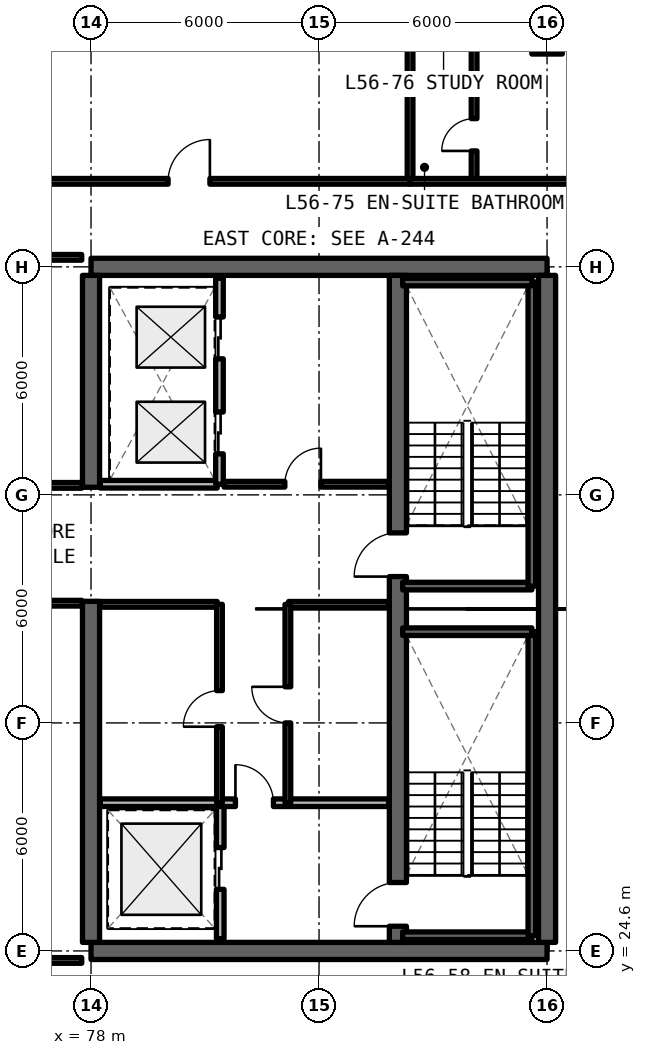
"""IFC4 building model, lengths in metres.
Left out: names, types, materials, properties, quantities, classifications, styles, units other than length and angle.
Written with IfcOpenShell. Run it as: python <this file> out.ifc"""

import sys

from ifc_helpers import new_model, si_unit, direction, frame, frame_2d, origin, origin_2d, place, context, subcontext, project, spatial, rectangle, extrude, element, fill, save


model = new_model("IFC4")
c1 = context("Model", 3, precision=1e-05, world=origin(), true_north=direction((0.0, 1.0)))
c2 = subcontext(c1, "Body", "Model", "MODEL_VIEW")
j1 = project(units=[si_unit("LENGTHUNIT", "METRE"), si_unit("PLANEANGLEUNIT", "RADIAN")], contexts=[c1])
p1 = place(None, origin())
s1 = spatial("IfcSite", under=j1, at=p1, CompositionType="ELEMENT")
p2 = place(p1, origin())
s2 = spatial("IfcBuilding", under=s1, at=p2, CompositionType="ELEMENT")
p3 = place(p2, frame((0.0, 0.0, 201.63)))
s3 = spatial("IfcBuildingStorey", under=s2, at=p3, CompositionType="ELEMENT", Elevation=201.63)
for number, where, z_axis, x_axis in (
    (1, (78.0, 24.6, 0.0), (0.0, 0.0, 1.0), (1.0, 0.0, 0.0)),
    (2, (90.0, 42.6, 0.0), (0.0, 0.0, 1.0), (-1.0, 0.0, 0.0)),
):
    element("IfcWall", number, at=place(p3, frame(where, z_axis=z_axis, x_axis=x_axis)), inside=s3, PredefinedType="SHEAR", context=c2, shape_type="SweptSolid", body=[
        extrude(rectangle(XDim=12.0, YDim=0.45, at=frame_2d((6.0, 0.0))), origin(), (0.0, 0.0, 1.0), 3.3),
    ])
p4 = place(p3, frame((90.0, 24.825, 0.0), z_axis=(0.0, 0.0, 1.0), x_axis=(0.0, 1.0, 0.0)))
e3 = element("IfcWall", 3, at=p4, inside=s3, PredefinedType="SHEAR", context=c2, shape_type="SweptSolid", body=[
    extrude(rectangle(XDim=17.55, YDim=0.45, at=frame_2d((8.775, 0.0))), origin(), (0.0, 0.0, 1.0), 3.3),
])
p5 = place(p3, frame((78.0, 24.825, 0.0), z_axis=(0.0, 0.0, 1.0), x_axis=(0.0, 1.0, 0.0)))
e4 = element("IfcWall", 4, at=p5, inside=s3, PredefinedType="SHEAR", context=c2, shape_type="SweptSolid", body=[
    extrude(rectangle(XDim=8.975, YDim=0.45, at=frame_2d((4.488, 0.0))), origin(), (0.0, 0.0, 1.0), 3.3),
])
p6 = place(p3, frame((78.0, 36.8, 0.0), z_axis=(0.0, 0.0, 1.0), x_axis=(0.0, 1.0, 0.0)))
e5 = element("IfcWall", 5, at=p6, inside=s3, PredefinedType="SHEAR", context=c2, shape_type="SweptSolid", body=[
    extrude(rectangle(XDim=5.575, YDim=0.45, at=frame_2d((2.788, 0.0))), origin(), (0.0, 0.0, 1.0), 3.3),
])
p7 = place(p3, frame((86.075, 24.825, 0.0), z_axis=(0.0, 0.0, 1.0), x_axis=(0.0, 1.0, 0.0)))
e6 = element("IfcWall", 6, at=p7, inside=s3, PredefinedType="SHEAR", context=c2, shape_type="SweptSolid", body=[
    extrude(rectangle(XDim=17.55, YDim=0.45, at=frame_2d((8.775, 0.0))), origin(), (0.0, 0.0, 1.0), 3.3),
])
p8 = place(p7, frame((0.425, 0.0, 0.0)))
e7 = element("IfcOpeningElement", 7, at=p8, cuts=e6, PredefinedType="OPENING", context=c2, shape_type="SweptSolid", body=[
    extrude(rectangle(XDim=1.15, YDim=2.15, at=frame_2d((0.575, 1.075))), frame((0.0, 0.235, 0.0), z_axis=(0.0, -1.0, 0.0), x_axis=(1.0, 0.0, 0.0)), (0.0, 0.0, 1.0), 0.47),
])
p9 = place(p7, frame((9.625, 0.0, 0.0)))
e8 = element("IfcOpeningElement", 8, at=p9, cuts=e6, PredefinedType="OPENING", context=c2, shape_type="SweptSolid", body=[
    extrude(rectangle(XDim=1.15, YDim=2.15, at=frame_2d((0.575, 1.075))), frame((0.0, 0.235, 0.0), z_axis=(0.0, -1.0, 0.0), x_axis=(1.0, 0.0, 0.0)), (0.0, 0.0, 1.0), 0.47),
])
p10 = place(p3, frame((90.0, 48.6, 0.0), z_axis=(0.0, 0.0, 1.0), x_axis=(1.0, 0.0, 0.0)))
e9 = element("IfcColumn", 9, at=p10, inside=s3, PredefinedType="COLUMN", context=c2, shape_type="SweptSolid", body=[
    extrude(rectangle(XDim=0.8, YDim=0.8, at=origin_2d()), origin(), (0.0, 0.0, 1.0), 3.3),
])
p11 = place(p3, frame((81.4, 24.92, 0.0), z_axis=(0.0, 0.0, 1.0), x_axis=(0.0, 1.0, 0.0)))
e10 = element("IfcWall", 10, at=p11, inside=s3, PredefinedType="SOLIDWALL", context=c2, shape_type="SweptSolid", body=[
    extrude(rectangle(XDim=3.58, YDim=0.2, at=frame_2d((1.79, 0.0))), origin(), (0.0, 0.0, 1.0), 2.35),
])
p12 = place(p11, frame((1.3, 0.0, 0.0)))
e11 = element("IfcOpeningElement", 11, at=p12, cuts=e10, PredefinedType="OPENING", context=c2, shape_type="SweptSolid", body=[
    extrude(rectangle(XDim=1.1, YDim=2.2, at=frame_2d((0.55, 1.1))), frame((0.0, 0.11, 0.0), z_axis=(0.0, -1.0, 0.0), x_axis=(1.0, 0.0, 0.0)), (0.0, 0.0, 1.0), 0.22),
])
p13 = place(p3, frame((78.245, 28.5, 0.0), z_axis=(0.0, 0.0, 1.0), x_axis=(1.0, 0.0, 0.0)))
e12 = element("IfcWall", 12, at=p13, inside=s3, PredefinedType="SOLIDWALL", context=c2, shape_type="SweptSolid", body=[
    extrude(rectangle(XDim=7.585, YDim=0.2, at=frame_2d((3.792, 0.0))), origin(), (0.0, 0.0, 1.0), 2.35),
])
p14 = place(p13, frame((3.555, 0.0, 0.0)))
e13 = element("IfcOpeningElement", 13, at=p14, cuts=e12, PredefinedType="OPENING", context=c2, shape_type="SweptSolid", body=[
    extrude(rectangle(XDim=1.0, YDim=2.15, at=frame_2d((0.5, 1.075))), frame((0.0, 0.11, 0.0), z_axis=(0.0, -1.0, 0.0), x_axis=(1.0, 0.0, 0.0)), (0.0, 0.0, 1.0), 0.22),
])
p15 = place(p3, frame((83.2, 33.72, 0.0), z_axis=(0.0, 0.0, 1.0), x_axis=(1.0, 0.0, 0.0)))
e14 = element("IfcWall", 14, at=p15, inside=s3, PredefinedType="SOLIDWALL", context=c2, shape_type="SweptSolid", body=[
    extrude(rectangle(XDim=2.63, YDim=0.15, at=frame_2d((1.315, 0.0))), origin(), (0.0, 0.0, 1.0), 2.35),
])
p16 = place(p3, frame((83.18, 28.5, 0.0), z_axis=(0.0, 0.0, 1.0), x_axis=(0.0, 1.0, 0.0)))
e15 = element("IfcWall", 15, at=p16, inside=s3, PredefinedType="SOLIDWALL", context=c2, shape_type="SweptSolid", body=[
    extrude(rectangle(XDim=5.22, YDim=0.15, at=frame_2d((2.61, 0.0))), origin(), (0.0, 0.0, 1.0), 2.35),
])
p17 = place(p16, frame((2.1, 0.0, 0.0)))
e16 = element("IfcOpeningElement", 16, at=p17, cuts=e15, PredefinedType="OPENING", context=c2, shape_type="SweptSolid", body=[
    extrude(rectangle(XDim=0.95, YDim=2.15, at=frame_2d((0.475, 1.075))), frame((0.0, 0.085, 0.0), z_axis=(0.0, -1.0, 0.0), x_axis=(1.0, 0.0, 0.0)), (0.0, 0.0, 1.0), 0.17),
])
p18 = place(p3, frame((78.245, 33.72, 0.0), z_axis=(0.0, 0.0, 1.0), x_axis=(1.0, 0.0, 0.0)))
e17 = element("IfcWall", 17, at=p18, inside=s3, PredefinedType="SOLIDWALL", context=c2, shape_type="SweptSolid", body=[
    extrude(rectangle(XDim=3.075, YDim=0.15, at=frame_2d((1.538, 0.0))), origin(), (0.0, 0.0, 1.0), 2.35),
])
p19 = place(p3, frame((81.38, 28.5, 0.0), z_axis=(0.0, 0.0, 1.0), x_axis=(0.0, 1.0, 0.0)))
e18 = element("IfcWall", 18, at=p19, inside=s3, PredefinedType="SOLIDWALL", context=c2, shape_type="SweptSolid", body=[
    extrude(rectangle(XDim=5.22, YDim=0.15, at=frame_2d((2.61, 0.0))), origin(), (0.0, 0.0, 1.0), 2.35),
])
p20 = place(p19, frame((2.0, 0.0, 0.0)))
e19 = element("IfcOpeningElement", 19, at=p20, cuts=e18, PredefinedType="OPENING", context=c2, shape_type="SweptSolid", body=[
    extrude(rectangle(XDim=0.95, YDim=2.15, at=frame_2d((0.475, 1.075))), frame((0.0, 0.085, 0.0), z_axis=(0.0, -1.0, 0.0), x_axis=(1.0, 0.0, 0.0)), (0.0, 0.0, 1.0), 0.17),
])
p21 = place(p3, frame((81.5, 36.88, 0.0), z_axis=(0.0, 0.0, 1.0), x_axis=(1.0, 0.0, 0.0)))
e20 = element("IfcWall", 20, at=p21, inside=s3, PredefinedType="SOLIDWALL", context=c2, shape_type="SweptSolid", body=[
    extrude(rectangle(XDim=4.33, YDim=0.15, at=frame_2d((2.165, 0.0))), origin(), (0.0, 0.0, 1.0), 2.35),
])
p22 = place(p21, frame((1.6, 0.0, 0.0)))
e21 = element("IfcOpeningElement", 21, at=p22, cuts=e20, PredefinedType="OPENING", context=c2, shape_type="SweptSolid", body=[
    extrude(rectangle(XDim=0.95, YDim=2.15, at=frame_2d((0.475, 1.075))), frame((0.0, 0.085, 0.0), z_axis=(0.0, -1.0, 0.0), x_axis=(1.0, 0.0, 0.0)), (0.0, 0.0, 1.0), 0.17),
])
p23 = place(p3, frame((78.245, 36.88, 0.0), z_axis=(0.0, 0.0, 1.0), x_axis=(1.0, 0.0, 0.0)))
e22 = element("IfcWall", 22, at=p23, inside=s3, PredefinedType="SOLIDWALL", context=c2, shape_type="SweptSolid", body=[
    extrude(rectangle(XDim=3.075, YDim=0.2, at=frame_2d((1.538, 0.0))), origin(), (0.0, 0.0, 1.0), 2.35),
])
p24 = place(p3, frame((81.38, 36.88, 0.0), z_axis=(0.0, 0.0, 1.0), x_axis=(0.0, 1.0, 0.0)))
e23 = element("IfcWall", 23, at=p24, inside=s3, PredefinedType="SOLIDWALL", context=c2, shape_type="SweptSolid", body=[
    extrude(rectangle(XDim=5.42, YDim=0.2, at=frame_2d((2.71, 0.0))), origin(), (0.0, 0.0, 1.0), 2.35),
])
p25 = place(p24, frame((0.8, 0.0, 0.0)))
e24 = element("IfcOpeningElement", 24, at=p25, cuts=e23, PredefinedType="OPENING", context=c2, shape_type="SweptSolid", body=[
    extrude(rectangle(XDim=1.1, YDim=2.2, at=frame_2d((0.55, 1.1))), frame((0.0, 0.11, 0.0), z_axis=(0.0, -1.0, 0.0), x_axis=(1.0, 0.0, 0.0)), (0.0, 0.0, 1.0), 0.22),
])
p26 = place(p24, frame((3.3, 0.0, 0.0)))
e25 = element("IfcOpeningElement", 25, at=p26, cuts=e23, PredefinedType="OPENING", context=c2, shape_type="SweptSolid", body=[
    extrude(rectangle(XDim=1.1, YDim=2.2, at=frame_2d((0.55, 1.1))), frame((0.0, 0.11, 0.0), z_axis=(0.0, -1.0, 0.0), x_axis=(1.0, 0.0, 0.0)), (0.0, 0.0, 1.0), 0.22),
])
p27 = place(p3, frame((69.85, 24.35, 0.0), z_axis=(0.0, 0.0, 1.0), x_axis=(1.0, 0.0, 0.0)))
e26 = element("IfcWall", 26, at=p27, inside=s3, PredefinedType="SOLIDWALL", context=c2, shape_type="SweptSolid", body=[
    extrude(rectangle(XDim=7.905, YDim=0.15, at=frame_2d((3.952, 0.0))), origin(), (0.0, 0.0, 1.0), 2.35),
])
p28 = place(p3, frame((69.85, 33.75, 0.0), z_axis=(0.0, 0.0, 1.0), x_axis=(1.0, 0.0, 0.0)))
e27 = element("IfcWall", 27, at=p28, inside=s3, PredefinedType="SOLIDWALL", context=c2, shape_type="SweptSolid", body=[
    extrude(rectangle(XDim=7.905, YDim=0.15, at=frame_2d((3.952, 0.0))), origin(), (0.0, 0.0, 1.0), 2.35),
])
p29 = place(p28, frame((3.478, 0.0, 0.0)))
e28 = element("IfcOpeningElement", 28, at=p29, cuts=e27, PredefinedType="OPENING", context=c2, shape_type="SweptSolid", body=[
    extrude(rectangle(XDim=0.95, YDim=2.15, at=frame_2d((0.475, 1.075))), frame((0.0, 0.085, 0.0), z_axis=(0.0, -1.0, 0.0), x_axis=(1.0, 0.0, 0.0)), (0.0, 0.0, 1.0), 0.17),
])
p30 = place(p3, frame((69.85, 36.85, 0.0), z_axis=(0.0, 0.0, 1.0), x_axis=(1.0, 0.0, 0.0)))
e29 = element("IfcWall", 29, at=p30, inside=s3, PredefinedType="SOLIDWALL", context=c2, shape_type="SweptSolid", body=[
    extrude(rectangle(XDim=7.905, YDim=0.15, at=frame_2d((3.952, 0.0))), origin(), (0.0, 0.0, 1.0), 2.35),
])
p31 = place(p30, frame((3.478, 0.0, 0.0)))
e30 = element("IfcOpeningElement", 30, at=p31, cuts=e29, PredefinedType="OPENING", context=c2, shape_type="SweptSolid", body=[
    extrude(rectangle(XDim=0.95, YDim=2.15, at=frame_2d((0.475, 1.075))), frame((0.0, 0.085, 0.0), z_axis=(0.0, -1.0, 0.0), x_axis=(1.0, 0.0, 0.0)), (0.0, 0.0, 1.0), 0.17),
])
p32 = place(p3, frame((69.85, 42.85, 0.0), z_axis=(0.0, 0.0, 1.0), x_axis=(1.0, 0.0, 0.0)))
e31 = element("IfcWall", 31, at=p32, inside=s3, PredefinedType="SOLIDWALL", context=c2, shape_type="SweptSolid", body=[
    extrude(rectangle(XDim=7.905, YDim=0.15, at=frame_2d((3.952, 0.0))), origin(), (0.0, 0.0, 1.0), 2.35),
])
p33 = place(p3, frame((86.395, 44.85, 0.0), z_axis=(0.0, 0.0, 1.0), x_axis=(0.0, 1.0, 0.0)))
e32 = element("IfcWall", 32, at=p33, inside=s3, PredefinedType="SOLIDWALL", context=c2, shape_type="SweptSolid", body=[
    extrude(rectangle(XDim=10.08, YDim=0.15, at=frame_2d((5.04, 0.0))), origin(), (0.0, 0.0, 1.0), 2.35),
])
p34 = place(p3, frame((74.76, 44.85, 0.0), z_axis=(0.0, 0.0, 1.0), x_axis=(1.0, 0.0, 0.0)))
e33 = element("IfcWall", 33, at=p34, inside=s3, PredefinedType="SOLIDWALL", context=c2, shape_type="SweptSolid", body=[
    extrude(rectangle(XDim=11.635, YDim=0.15, at=frame_2d((5.817, 0.0))), origin(), (0.0, 0.0, 1.0), 2.35),
])
p35 = place(p34, frame((5.267, 0.0, 0.0)))
e34 = element("IfcOpeningElement", 34, at=p35, cuts=e33, PredefinedType="OPENING", context=c2, shape_type="SweptSolid", body=[
    extrude(rectangle(XDim=1.1, YDim=2.15, at=frame_2d((0.55, 1.075))), frame((0.0, 0.085, 0.0), z_axis=(0.0, -1.0, 0.0), x_axis=(1.0, 0.0, 0.0)), (0.0, 0.0, 1.0), 0.17),
])
p36 = place(p3, frame((86.395, 47.3, 0.0), z_axis=(0.0, 0.0, 1.0), x_axis=(1.0, 0.0, 0.0)))
e35 = element("IfcWall", 35, at=p36, inside=s3, PredefinedType="PARTITIONING", context=c2, shape_type="SweptSolid", body=[
    extrude(rectangle(XDim=1.685, YDim=0.15, at=frame_2d((0.842, 0.0))), origin(), (0.0, 0.0, 1.0), 2.35),
])
p37 = place(p3, frame((88.08, 44.85, 0.0), z_axis=(0.0, 0.0, 1.0), x_axis=(0.0, 1.0, 0.0)))
e36 = element("IfcWall", 36, at=p37, inside=s3, PredefinedType="PARTITIONING", context=c2, shape_type="SweptSolid", body=[
    extrude(rectangle(XDim=10.08, YDim=0.15, at=frame_2d((5.04, 0.0))), origin(), (0.0, 0.0, 1.0), 2.35),
])
p38 = place(p37, frame((0.8, 0.0, 0.0)))
e37 = element("IfcOpeningElement", 37, at=p38, cuts=e36, PredefinedType="OPENING", context=c2, shape_type="SweptSolid", body=[
    extrude(rectangle(XDim=0.85, YDim=2.1, at=frame_2d((0.425, 1.05))), frame((0.0, 0.085, 0.0), z_axis=(0.0, -1.0, 0.0), x_axis=(1.0, 0.0, 0.0)), (0.0, 0.0, 1.0), 0.17),
])
p39 = place(p37, frame((5.162, 0.0, 0.0)))
e38 = element("IfcOpeningElement", 38, at=p39, cuts=e36, PredefinedType="OPENING", context=c2, shape_type="SweptSolid", body=[
    extrude(rectangle(XDim=0.85, YDim=2.1, at=frame_2d((0.425, 1.05))), frame((0.0, 0.085, 0.0), z_axis=(0.0, -1.0, 0.0), x_axis=(1.0, 0.0, 0.0)), (0.0, 0.0, 1.0), 0.17),
])
p40 = place(p3, frame((86.395, 44.85, 0.0), z_axis=(0.0, 0.0, 1.0), x_axis=(1.0, 0.0, 0.0)))
e39 = element("IfcWall", 39, at=p40, inside=s3, PredefinedType="SOLIDWALL", context=c2, shape_type="SweptSolid", body=[
    extrude(rectangle(XDim=8.805, YDim=0.15, at=frame_2d((4.402, 0.0))), origin(), (0.0, 0.0, 1.0), 2.35),
])
p41 = place(p40, frame((4.81, 0.0, 0.0)))
e40 = element("IfcOpeningElement", 40, at=p41, cuts=e39, PredefinedType="OPENING", context=c2, shape_type="SweptSolid", body=[
    extrude(rectangle(XDim=0.95, YDim=2.15, at=frame_2d((0.475, 1.075))), frame((0.0, 0.085, 0.0), z_axis=(0.0, -1.0, 0.0), x_axis=(1.0, 0.0, 0.0)), (0.0, 0.0, 1.0), 0.17),
])
p42 = place(p3, frame((86.2, 25.0, 0.0), z_axis=(0.0, 0.0, 1.0), x_axis=(1.0, 0.0, 0.0)))
e41 = element("IfcWall", 41, at=p42, inside=s3, PredefinedType="SOLIDWALL", context=c2, shape_type="SweptSolid", body=[
    extrude(rectangle(XDim=3.4, YDim=0.2, at=frame_2d((1.7, 0.0))), origin(), (0.0, 0.0, 1.0), 3.3),
])
p43 = place(p3, frame((89.6, 25.0, 0.0), z_axis=(0.0, 0.0, 1.0), x_axis=(0.0, 1.0, 0.0)))
e42 = element("IfcWall", 42, at=p43, inside=s3, PredefinedType="SOLIDWALL", context=c2, shape_type="SweptSolid", body=[
    extrude(rectangle(XDim=8.0, YDim=0.2, at=frame_2d((4.0, 0.0))), origin(), (0.0, 0.0, 1.0), 3.3),
])
for number, where, z_axis, x_axis in (
    (43, (89.6, 33.0, 0.0), (0.0, 0.0, 1.0), (-1.0, 0.0, 0.0)),
    (44, (86.2, 34.2, 0.0), (0.0, 0.0, 1.0), (1.0, 0.0, 0.0)),
):
    element("IfcWall", number, at=place(p3, frame(where, z_axis=z_axis, x_axis=x_axis)), inside=s3, PredefinedType="SOLIDWALL", context=c2, shape_type="SweptSolid", body=[
        extrude(rectangle(XDim=3.4, YDim=0.2, at=frame_2d((1.7, 0.0))), origin(), (0.0, 0.0, 1.0), 3.3),
    ])
p44 = place(p3, frame((89.6, 34.2, 0.0), z_axis=(0.0, 0.0, 1.0), x_axis=(0.0, 1.0, 0.0)))
e45 = element("IfcWall", 45, at=p44, inside=s3, PredefinedType="SOLIDWALL", context=c2, shape_type="SweptSolid", body=[
    extrude(rectangle(XDim=8.0, YDim=0.2, at=frame_2d((4.0, 0.0))), origin(), (0.0, 0.0, 1.0), 3.3),
])
p45 = place(p3, frame((89.6, 42.2, 0.0), z_axis=(0.0, 0.0, 1.0), x_axis=(-1.0, 0.0, 0.0)))
e46 = element("IfcWall", 46, at=p45, inside=s3, PredefinedType="SOLIDWALL", context=c2, shape_type="SweptSolid", body=[
    extrude(rectangle(XDim=3.4, YDim=0.2, at=frame_2d((1.7, 0.0))), origin(), (0.0, 0.0, 1.0), 3.3),
])
p46 = place(p12, origin())
e47 = element("IfcDoor", 47, at=p46, inside=s3, OperationType="SLIDING_TO_LEFT", PredefinedType="DOOR", context=c2, shape_type="SweptSolid", body=[
    extrude(rectangle(XDim=1.1, YDim=2.2, at=frame_2d((0.55, 1.1))), frame((0.0, 0.025, 0.0), z_axis=(0.0, -1.0, 0.0), x_axis=(1.0, 0.0, 0.0)), (0.0, 0.0, 1.0), 0.05),
])
fill(e11, e47)
p47 = place(p14, origin())
e48 = element("IfcDoor", 48, at=p47, inside=s3, OperationType="SINGLE_SWING_LEFT", PredefinedType="DOOR", context=c2, shape_type="SweptSolid", body=[
    extrude(rectangle(XDim=1.0, YDim=2.15, at=frame_2d((0.5, 1.075))), frame((0.0, 0.025, 0.0), z_axis=(0.0, -1.0, 0.0), x_axis=(1.0, 0.0, 0.0)), (0.0, 0.0, 1.0), 0.05),
])
fill(e13, e48)
p48 = place(p17, origin())
e49 = element("IfcDoor", 49, at=p48, inside=s3, OperationType="SINGLE_SWING_RIGHT", PredefinedType="DOOR", context=c2, shape_type="SweptSolid", body=[
    extrude(rectangle(XDim=0.95, YDim=2.15, at=frame_2d((0.475, 1.075))), frame((0.0, 0.025, 0.0), z_axis=(0.0, -1.0, 0.0), x_axis=(1.0, 0.0, 0.0)), (0.0, 0.0, 1.0), 0.05),
])
fill(e16, e49)
p49 = place(p20, origin())
e50 = element("IfcDoor", 50, at=p49, inside=s3, OperationType="SINGLE_SWING_LEFT", PredefinedType="DOOR", context=c2, shape_type="SweptSolid", body=[
    extrude(rectangle(XDim=0.95, YDim=2.15, at=frame_2d((0.475, 1.075))), frame((0.0, 0.025, 0.0), z_axis=(0.0, -1.0, 0.0), x_axis=(1.0, 0.0, 0.0)), (0.0, 0.0, 1.0), 0.05),
])
fill(e19, e50)
p50 = place(p22, origin())
e51 = element("IfcDoor", 51, at=p50, inside=s3, OperationType="SINGLE_SWING_RIGHT", PredefinedType="DOOR", context=c2, shape_type="SweptSolid", body=[
    extrude(rectangle(XDim=0.95, YDim=2.15, at=frame_2d((0.475, 1.075))), frame((0.0, 0.025, 0.0), z_axis=(0.0, -1.0, 0.0), x_axis=(1.0, 0.0, 0.0)), (0.0, 0.0, 1.0), 0.05),
])
fill(e21, e51)
p51 = place(p25, origin())
e52 = element("IfcDoor", 52, at=p51, inside=s3, OperationType="SLIDING_TO_LEFT", PredefinedType="DOOR", context=c2, shape_type="SweptSolid", body=[
    extrude(rectangle(XDim=1.1, YDim=2.2, at=frame_2d((0.55, 1.1))), frame((0.0, 0.025, 0.0), z_axis=(0.0, -1.0, 0.0), x_axis=(1.0, 0.0, 0.0)), (0.0, 0.0, 1.0), 0.05),
])
fill(e24, e52)
p52 = place(p26, origin())
e53 = element("IfcDoor", 53, at=p52, inside=s3, OperationType="SLIDING_TO_RIGHT", PredefinedType="DOOR", context=c2, shape_type="SweptSolid", body=[
    extrude(rectangle(XDim=1.1, YDim=2.2, at=frame_2d((0.55, 1.1))), frame((0.0, 0.025, 0.0), z_axis=(0.0, -1.0, 0.0), x_axis=(1.0, 0.0, 0.0)), (0.0, 0.0, 1.0), 0.05),
])
fill(e25, e53)
p53 = place(p35, origin())
e54 = element("IfcDoor", 54, at=p53, inside=s3, OperationType="SINGLE_SWING_RIGHT", PredefinedType="DOOR", context=c2, shape_type="SweptSolid", body=[
    extrude(rectangle(XDim=1.1, YDim=2.15, at=frame_2d((0.55, 1.075))), frame((0.0, 0.025, 0.0), z_axis=(0.0, -1.0, 0.0), x_axis=(1.0, 0.0, 0.0)), (0.0, 0.0, 1.0), 0.05),
])
fill(e34, e54)
p54 = place(p38, origin())
e55 = element("IfcDoor", 55, at=p54, inside=s3, OperationType="SINGLE_SWING_LEFT", PredefinedType="DOOR", context=c2, shape_type="SweptSolid", body=[
    extrude(rectangle(XDim=0.85, YDim=2.1, at=frame_2d((0.425, 1.05))), frame((0.0, 0.025, 0.0), z_axis=(0.0, -1.0, 0.0), x_axis=(1.0, 0.0, 0.0)), (0.0, 0.0, 1.0), 0.05),
])
fill(e37, e55)
p55 = place(p8, origin())
e56 = element("IfcDoor", 56, at=p55, inside=s3, OperationType="SINGLE_SWING_RIGHT", PredefinedType="DOOR", context=c2, shape_type="SweptSolid", body=[
    extrude(rectangle(XDim=1.15, YDim=2.15, at=frame_2d((0.575, 1.075))), frame((0.0, 0.025, 0.0), z_axis=(0.0, -1.0, 0.0), x_axis=(1.0, 0.0, 0.0)), (0.0, 0.0, 1.0), 0.05),
])
fill(e7, e56)
p56 = place(p9, origin())
e57 = element("IfcDoor", 57, at=p56, inside=s3, OperationType="SINGLE_SWING_LEFT", PredefinedType="DOOR", context=c2, shape_type="SweptSolid", body=[
    extrude(rectangle(XDim=1.15, YDim=2.15, at=frame_2d((0.575, 1.075))), frame((0.0, 0.025, 0.0), z_axis=(0.0, -1.0, 0.0), x_axis=(1.0, 0.0, 0.0)), (0.0, 0.0, 1.0), 0.05),
])
fill(e8, e57)
save(model, sys.argv[1])
